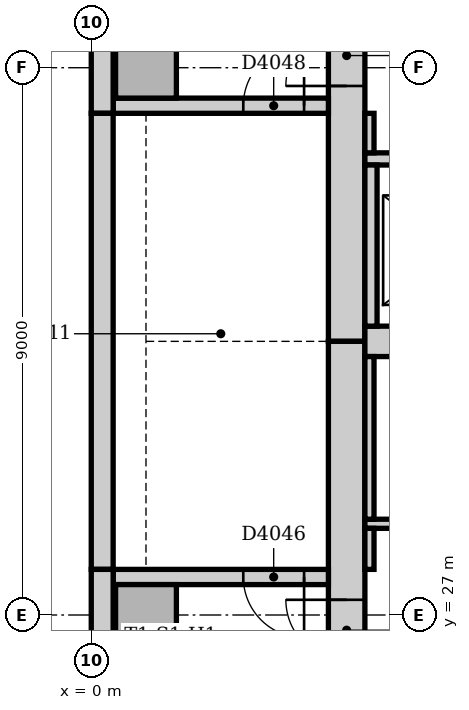
"""IFC4 building model, lengths in metres.
Left out: names, types, materials, properties, quantities, classifications, styles, units other than length and angle.
Written with IfcOpenShell. Run it as: python <this file> out.ifc"""

import sys

from ifc_helpers import new_model, si_unit, direction, frame, frame_2d, origin, origin_2d, place, context, subcontext, project, spatial, rectangle, extrude, element, fill, save


model = new_model("IFC4")
c1 = context("Model", 3, precision=1e-05, world=origin(), true_north=direction((0.0, 1.0)))
c2 = subcontext(c1, "Body", "Model", "MODEL_VIEW")
j1 = project(units=[si_unit("LENGTHUNIT", "METRE"), si_unit("PLANEANGLEUNIT", "RADIAN")], contexts=[c1])
p1 = place(None, origin())
s1 = spatial("IfcSite", under=j1, at=p1, CompositionType="ELEMENT")
p2 = place(p1, origin())
s2 = spatial("IfcBuilding", under=s1, at=p2, CompositionType="ELEMENT")
p3 = place(p2, frame((0.0, 0.0, 112.0)))
s3 = spatial("IfcBuildingStorey", under=s2, at=p3, CompositionType="ELEMENT", Elevation=112.0)
p4 = place(p3, frame((4.2, 42.0, 0.0), z_axis=(0.0, 0.0, 1.0), x_axis=(0.0, -1.0, 0.0)))
e1 = element("IfcWall", 1, at=p4, inside=s3, PredefinedType="SOLIDWALL", context=c2, shape_type="SweptSolid", body=[
    extrude(rectangle(XDim=10.5, YDim=0.6, at=frame_2d((5.25, 0.0))), origin(), (0.0, 0.0, 1.0), 4.0),
])
p5 = place(p4, frame((5.3, 0.0, 0.0)))
e2 = element("IfcOpeningElement", 2, at=p5, cuts=e1, PredefinedType="OPENING", context=c2, shape_type="SweptSolid", body=[
    extrude(rectangle(XDim=1.0, YDim=2.1, at=frame_2d((0.5, 1.05))), frame((0.0, 0.31, 0.0), z_axis=(0.0, -1.0, 0.0), x_axis=(1.0, 0.0, 0.0)), (0.0, 0.0, 1.0), 0.62),
])
p6 = place(p3, frame((4.2, 31.5, 0.0), z_axis=(0.0, 0.0, 1.0), x_axis=(0.0, -1.0, 0.0)))
e3 = element("IfcWall", 3, at=p6, inside=s3, PredefinedType="SOLIDWALL", context=c2, shape_type="SweptSolid", body=[
    extrude(rectangle(XDim=10.5, YDim=0.6, at=frame_2d((5.25, 0.0))), origin(), (0.0, 0.0, 1.0), 4.0),
])
p7 = place(p6, frame((4.25, 0.0, 0.0)))
e4 = element("IfcOpeningElement", 4, at=p7, cuts=e3, PredefinedType="OPENING", context=c2, shape_type="SweptSolid", body=[
    extrude(rectangle(XDim=1.0, YDim=2.1, at=frame_2d((0.5, 1.05))), frame((0.0, 0.31, 0.0), z_axis=(0.0, -1.0, 0.0), x_axis=(1.0, 0.0, 0.0)), (0.0, 0.0, 1.0), 0.62),
])
p8 = place(p3, frame((4.5, 31.5, 0.0), z_axis=(0.0, 0.0, 1.0), x_axis=(1.0, 0.0, 0.0)))
e5 = element("IfcWall", 5, at=p8, inside=s3, PredefinedType="SOLIDWALL", context=c2, shape_type="SweptSolid", body=[
    extrude(rectangle(XDim=18.0, YDim=0.5, at=frame_2d((9.0, 0.0))), origin(), (0.0, 0.0, 1.0), 4.0),
])
p9 = place(p3, frame((3.9, 27.625, 0.0), z_axis=(0.0, 0.0, 1.0), x_axis=(-1.0, 0.0, 0.0)))
e6 = element("IfcWall", 6, at=p9, inside=s3, PredefinedType="SOLIDWALL", context=c2, shape_type="SweptSolid", body=[
    extrude(rectangle(XDim=3.54, YDim=0.25, at=frame_2d((1.77, 0.0))), origin(), (0.0, 0.0, 1.0), 4.0),
])
p10 = place(p9, frame((0.4, 0.0, 0.0)))
e7 = element("IfcOpeningElement", 7, at=p10, cuts=e6, PredefinedType="OPENING", context=c2, shape_type="SweptSolid", body=[
    extrude(rectangle(XDim=1.0, YDim=2.1, at=frame_2d((0.5, 1.05))), frame((0.0, 0.135, 0.0), z_axis=(0.0, -1.0, 0.0), x_axis=(1.0, 0.0, 0.0)), (0.0, 0.0, 1.0), 0.27),
])
p11 = place(p3, frame((0.36, 35.375, 0.0), z_axis=(0.0, 0.0, 1.0), x_axis=(1.0, 0.0, 0.0)))
e8 = element("IfcWall", 8, at=p11, inside=s3, PredefinedType="SOLIDWALL", context=c2, shape_type="SweptSolid", body=[
    extrude(rectangle(XDim=3.54, YDim=0.25, at=frame_2d((1.77, 0.0))), origin(), (0.0, 0.0, 1.0), 4.0),
])
p12 = place(p11, frame((2.14, 0.0, 0.0)))
e9 = element("IfcOpeningElement", 9, at=p12, cuts=e8, PredefinedType="OPENING", context=c2, shape_type="SweptSolid", body=[
    extrude(rectangle(XDim=1.0, YDim=2.1, at=frame_2d((0.5, 1.05))), frame((0.0, 0.135, 0.0), z_axis=(0.0, -1.0, 0.0), x_axis=(1.0, 0.0, 0.0)), (0.0, 0.0, 1.0), 0.27),
])
for number, where, z_axis, x_axis in (
    (10, (0.9, 27.0, 0.0), (0.0, 0.0, 1.0), (1.0, 0.0, 0.0)),
    (11, (0.9, 36.0, 0.0), (0.0, 0.0, 1.0), (1.0, 0.0, 0.0)),
):
    element("IfcColumn", number, at=place(p3, frame(where, z_axis=z_axis, x_axis=x_axis)), inside=s3, PredefinedType="COLUMN", context=c2, shape_type="SweptSolid", body=[
        extrude(rectangle(XDim=1.0, YDim=1.0, at=origin_2d()), origin(), (0.0, 0.0, 1.0), 4.0),
    ])
p13 = place(p3, frame((0.18, 42.0, 0.0), z_axis=(0.0, 0.0, 1.0), x_axis=(0.0, -1.0, 0.0)))
e12 = element("IfcWall", 12, at=p13, inside=s3, PredefinedType="STANDARD", context=c2, shape_type="SweptSolid", body=[
    extrude(rectangle(XDim=6.75, YDim=0.36, at=frame_2d((3.375, 0.0))), origin(), (0.0, 0.0, 1.0), 3.85),
])
p14 = place(p3, frame((0.18, 35.25, 0.0), z_axis=(0.0, 0.0, 1.0), x_axis=(0.0, -1.0, 0.0)))
e13 = element("IfcWall", 13, at=p14, inside=s3, PredefinedType="STANDARD", context=c2, shape_type="SweptSolid", body=[
    extrude(rectangle(XDim=7.5, YDim=0.36, at=frame_2d((3.75, 0.0))), origin(), (0.0, 0.0, 1.0), 3.85),
])
p15 = place(p3, frame((0.18, 27.75, 0.0), z_axis=(0.0, 0.0, 1.0), x_axis=(0.0, -1.0, 0.0)))
e14 = element("IfcWall", 14, at=p15, inside=s3, PredefinedType="STANDARD", context=c2, shape_type="SweptSolid", body=[
    extrude(rectangle(XDim=6.75, YDim=0.36, at=frame_2d((3.375, 0.0))), origin(), (0.0, 0.0, 1.0), 3.85),
])
p16 = place(p3, frame((4.5, 34.5, 0.0), z_axis=(0.0, 0.0, 1.0), x_axis=(1.0, 0.0, 0.0)))
e15 = element("IfcWall", 15, at=p16, inside=s3, PredefinedType="PARTITIONING", context=c2, shape_type="SweptSolid", body=[
    extrude(rectangle(XDim=18.0, YDim=0.2, at=frame_2d((9.0, 0.0))), origin(), (0.0, 0.0, 1.0), 3.85),
])
p17 = place(p16, frame((0.95, 0.0, 0.0)))
e16 = element("IfcOpeningElement", 16, at=p17, cuts=e15, PredefinedType="OPENING", context=c2, shape_type="SweptSolid", body=[
    extrude(rectangle(XDim=1.1, YDim=2.1, at=frame_2d((0.55, 1.05))), frame((0.0, 0.11, 0.0), z_axis=(0.0, -1.0, 0.0), x_axis=(1.0, 0.0, 0.0)), (0.0, 0.0, 1.0), 0.22),
])
p18 = place(p16, frame((3.95, 0.0, 0.0)))
e17 = element("IfcOpeningElement", 17, at=p18, cuts=e15, PredefinedType="OPENING", context=c2, shape_type="SweptSolid", body=[
    extrude(rectangle(XDim=1.1, YDim=2.1, at=frame_2d((0.55, 1.05))), frame((0.0, 0.11, 0.0), z_axis=(0.0, -1.0, 0.0), x_axis=(1.0, 0.0, 0.0)), (0.0, 0.0, 1.0), 0.22),
])
p19 = place(p16, frame((12.95, 0.0, 0.0)))
e18 = element("IfcOpeningElement", 18, at=p19, cuts=e15, PredefinedType="OPENING", context=c2, shape_type="SweptSolid", body=[
    extrude(rectangle(XDim=1.1, YDim=2.1, at=frame_2d((0.55, 1.05))), frame((0.0, 0.11, 0.0), z_axis=(0.0, -1.0, 0.0), x_axis=(1.0, 0.0, 0.0)), (0.0, 0.0, 1.0), 0.22),
])
p20 = place(p16, frame((15.95, 0.0, 0.0)))
e19 = element("IfcOpeningElement", 19, at=p20, cuts=e15, PredefinedType="OPENING", context=c2, shape_type="SweptSolid", body=[
    extrude(rectangle(XDim=1.1, YDim=2.1, at=frame_2d((0.55, 1.05))), frame((0.0, 0.11, 0.0), z_axis=(0.0, -1.0, 0.0), x_axis=(1.0, 0.0, 0.0)), (0.0, 0.0, 1.0), 0.22),
])
p21 = place(p3, frame((4.6, 31.75, 0.0), z_axis=(0.0, 0.0, 1.0), x_axis=(0.0, 1.0, 0.0)))
e20 = element("IfcWall", 20, at=p21, inside=s3, PredefinedType="PARTITIONING", context=c2, shape_type="SweptSolid", body=[
    extrude(rectangle(XDim=2.65, YDim=0.2, at=frame_2d((1.325, 0.0))), origin(), (0.0, 0.0, 1.0), 3.85),
])
p22 = place(p3, frame((4.5, 28.5, 0.0), z_axis=(0.0, 0.0, 1.0), x_axis=(1.0, 0.0, 0.0)))
e21 = element("IfcWall", 21, at=p22, inside=s3, PredefinedType="PARTITIONING", context=c2, shape_type="SweptSolid", body=[
    extrude(rectangle(XDim=18.0, YDim=0.15, at=frame_2d((9.0, 0.0))), origin(), (0.0, 0.0, 1.0), 3.85),
])
p23 = place(p22, frame((1.85, 0.0, 0.0)))
e22 = element("IfcOpeningElement", 22, at=p23, cuts=e21, PredefinedType="OPENING", context=c2, shape_type="SweptSolid", body=[
    extrude(rectangle(XDim=0.9, YDim=2.1, at=frame_2d((0.45, 1.05))), frame((0.0, 0.085, 0.0), z_axis=(0.0, -1.0, 0.0), x_axis=(1.0, 0.0, 0.0)), (0.0, 0.0, 1.0), 0.17),
])
p24 = place(p22, frame((6.3, 0.0, 0.0)))
e23 = element("IfcOpeningElement", 23, at=p24, cuts=e21, PredefinedType="OPENING", context=c2, shape_type="SweptSolid", body=[
    extrude(rectangle(XDim=0.9, YDim=2.1, at=frame_2d((0.45, 1.05))), frame((0.0, 0.085, 0.0), z_axis=(0.0, -1.0, 0.0), x_axis=(1.0, 0.0, 0.0)), (0.0, 0.0, 1.0), 0.17),
])
p25 = place(p22, frame((12.95, 0.0, 0.0)))
e24 = element("IfcOpeningElement", 24, at=p25, cuts=e21, PredefinedType="OPENING", context=c2, shape_type="SweptSolid", body=[
    extrude(rectangle(XDim=0.9, YDim=2.1, at=frame_2d((0.45, 1.05))), frame((0.0, 0.085, 0.0), z_axis=(0.0, -1.0, 0.0), x_axis=(1.0, 0.0, 0.0)), (0.0, 0.0, 1.0), 0.17),
])
p26 = place(p3, frame((4.575, 27.75, 0.0), z_axis=(0.0, 0.0, 1.0), x_axis=(0.0, 1.0, 0.0)))
e25 = element("IfcWall", 25, at=p26, inside=s3, PredefinedType="PARTITIONING", context=c2, shape_type="SweptSolid", body=[
    extrude(rectangle(XDim=0.675, YDim=0.15, at=frame_2d((0.338, 0.0))), origin(), (0.0, 0.0, 1.0), 3.85),
])
p27 = place(p3, frame((4.575, 28.575, 0.0), z_axis=(0.0, 0.0, 1.0), x_axis=(0.0, 1.0, 0.0)))
e26 = element("IfcWall", 26, at=p27, inside=s3, PredefinedType="PARTITIONING", context=c2, shape_type="SweptSolid", body=[
    extrude(rectangle(XDim=2.675, YDim=0.15, at=frame_2d((1.337, 0.0))), origin(), (0.0, 0.0, 1.0), 3.85),
])
p28 = place(p3, frame((4.575, 34.6, 0.0), z_axis=(0.0, 0.0, 1.0), x_axis=(0.0, 1.0, 0.0)))
e27 = element("IfcWall", 27, at=p28, inside=s3, PredefinedType="PARTITIONING", context=c2, shape_type="SweptSolid", body=[
    extrude(rectangle(XDim=0.65, YDim=0.15, at=frame_2d((0.325, 0.0))), origin(), (0.0, 0.0, 1.0), 3.85),
])
p29 = place(p7, frame((1.0, 0.0, 0.0), z_axis=(0.0, 0.0, 1.0), x_axis=(-1.0, 0.0, 0.0)))
e28 = element("IfcDoor", 28, at=p29, inside=s3, OperationType="SINGLE_SWING_RIGHT", PredefinedType="DOOR", context=c2, shape_type="SweptSolid", body=[
    extrude(rectangle(XDim=1.0, YDim=2.1, at=frame_2d((0.5, 1.05))), frame((0.0, 0.025, 0.0), z_axis=(0.0, -1.0, 0.0), x_axis=(1.0, 0.0, 0.0)), (0.0, 0.0, 1.0), 0.05),
])
fill(e4, e28)
p30 = place(p10, origin())
e29 = element("IfcDoor", 29, at=p30, inside=s3, OperationType="SINGLE_SWING_LEFT", PredefinedType="DOOR", context=c2, shape_type="SweptSolid", body=[
    extrude(rectangle(XDim=1.0, YDim=2.1, at=frame_2d((0.5, 1.05))), frame((0.0, 0.025, 0.0), z_axis=(0.0, -1.0, 0.0), x_axis=(1.0, 0.0, 0.0)), (0.0, 0.0, 1.0), 0.05),
])
fill(e7, e29)
p31 = place(p5, frame((1.0, 0.0, 0.0), z_axis=(0.0, 0.0, 1.0), x_axis=(-1.0, 0.0, 0.0)))
e30 = element("IfcDoor", 30, at=p31, inside=s3, OperationType="SINGLE_SWING_LEFT", PredefinedType="DOOR", context=c2, shape_type="SweptSolid", body=[
    extrude(rectangle(XDim=1.0, YDim=2.1, at=frame_2d((0.5, 1.05))), frame((0.0, 0.025, 0.0), z_axis=(0.0, -1.0, 0.0), x_axis=(1.0, 0.0, 0.0)), (0.0, 0.0, 1.0), 0.05),
])
fill(e2, e30)
p32 = place(p12, origin())
e31 = element("IfcDoor", 31, at=p32, inside=s3, OperationType="SINGLE_SWING_RIGHT", PredefinedType="DOOR", context=c2, shape_type="SweptSolid", body=[
    extrude(rectangle(XDim=1.0, YDim=2.1, at=frame_2d((0.5, 1.05))), frame((0.0, 0.025, 0.0), z_axis=(0.0, -1.0, 0.0), x_axis=(1.0, 0.0, 0.0)), (0.0, 0.0, 1.0), 0.05),
])
fill(e9, e31)
save(model, sys.argv[1])
